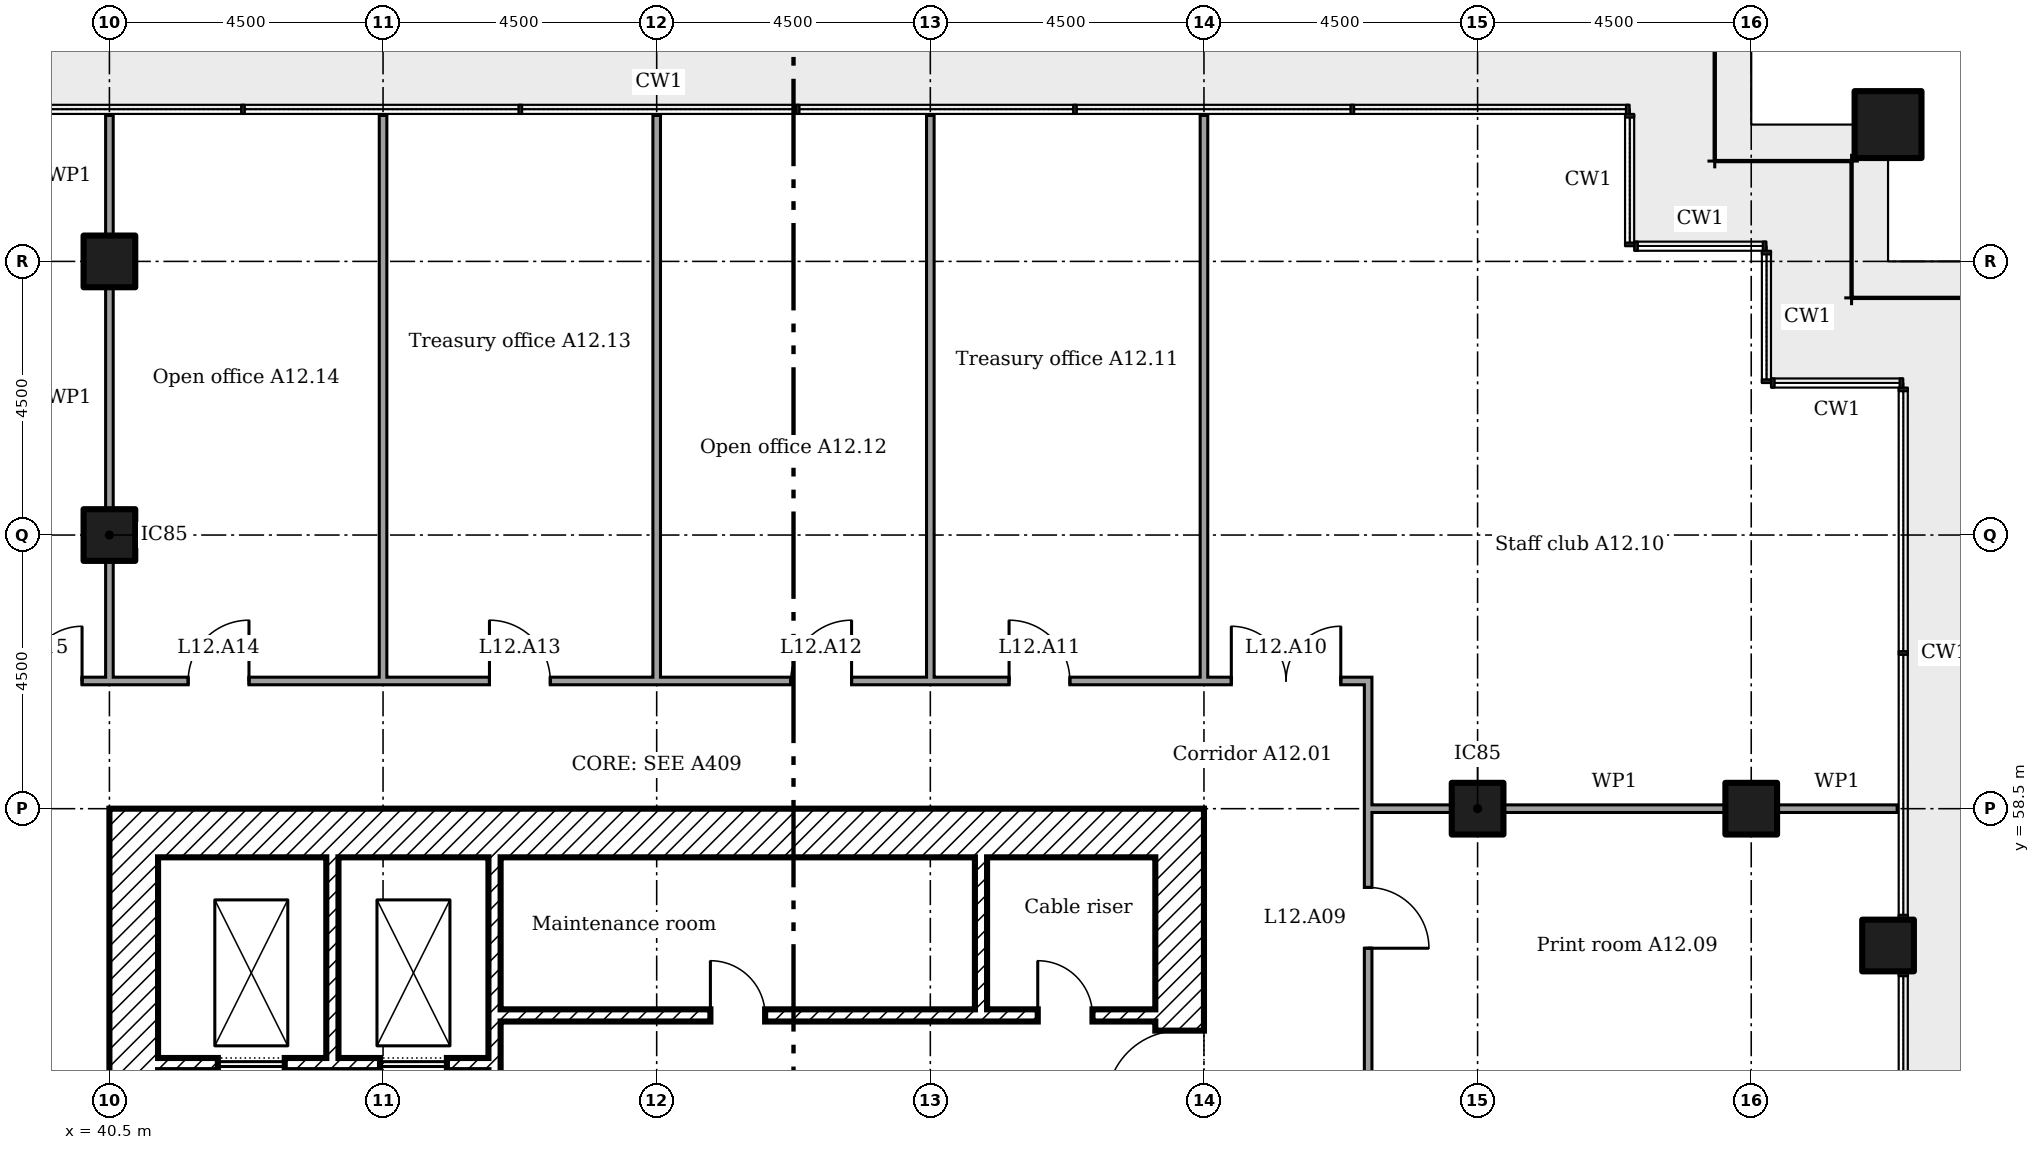
"""IFC4 building model, lengths in metres.
Left out: names, types, materials, properties, quantities, classifications, styles, units other than length and angle.
Written with IfcOpenShell. Run it as: python <this file> out.ifc"""

import sys

from ifc_helpers import new_model, si_unit, direction, frame, frame_2d, origin, origin_2d, place, context, subcontext, project, spatial, rectangle, extrude, element, fill, save


model = new_model("IFC4")
c1 = context("Model", 3, precision=1e-05, world=origin(), true_north=direction((0.0, 1.0)))
c2 = subcontext(c1, "Body", "Model", "MODEL_VIEW")
j1 = project(units=[si_unit("LENGTHUNIT", "METRE"), si_unit("PLANEANGLEUNIT", "RADIAN")], contexts=[c1])
p1 = place(None, origin())
s1 = spatial("IfcSite", under=j1, at=p1, CompositionType="ELEMENT")
p2 = place(p1, origin())
s2 = spatial("IfcBuilding", under=s1, at=p2, CompositionType="ELEMENT")
p3 = place(p2, frame((0.0, 0.0, 54.6)))
s3 = spatial("IfcBuildingStorey", under=s2, at=p3, CompositionType="ELEMENT", Elevation=54.6)
p4 = place(p3, frame((69.75, 69.75, 0.0)))
e1 = element("IfcColumn", 1, at=p4, inside=s3, PredefinedType="COLUMN", context=c2, shape_type="SweptSolid", body=[
    extrude(rectangle(XDim=1.1, YDim=1.1, at=origin_2d()), origin(), (0.0, 0.0, 1.0), 3.6),
])
for number, where in (
    (2, (40.5, 63.0, 0.0)),
    (3, (40.5, 67.5, 0.0)),
    (4, (63.0, 58.5, 0.0)),
    (5, (67.5, 58.5, 0.0)),
    (6, (69.75, 56.25, 0.0)),
):
    element("IfcColumn", number, at=place(p3, frame(where)), inside=s3, PredefinedType="COLUMN", context=c2, shape_type="SweptSolid", body=[
        extrude(rectangle(XDim=0.85, YDim=0.85, at=origin_2d()), origin(), (0.0, 0.0, 1.0), 3.6),
    ])
p5 = place(p3, frame((58.1, 40.5, 0.0), z_axis=(0.0, 0.0, 1.0), x_axis=(0.0, 1.0, 0.0)))
e7 = element("IfcWall", 7, at=p5, inside=s3, PredefinedType="SHEAR", context=c2, shape_type="SweptSolid", body=[
    extrude(rectangle(XDim=18.0, YDim=0.8, at=frame_2d((9.0, 0.0))), origin(), (0.0, 0.0, 1.0), 3.35),
])
p6 = place(p5, frame((13.15, 0.0, 0.0)))
e8 = element("IfcOpeningElement", 8, at=p6, cuts=e7, PredefinedType="OPENING", context=c2, shape_type="SweptSolid", body=[
    extrude(rectangle(XDim=1.2, YDim=2.1, at=frame_2d((0.6, 1.05))), frame((0.0, 0.41, 0.0), z_axis=(0.0, -1.0, 0.0), x_axis=(1.0, 0.0, 0.0)), (0.0, 0.0, 1.0), 0.82),
])
p7 = place(p5, frame((3.9, 0.0, 0.0)))
e9 = element("IfcOpeningElement", 9, at=p7, cuts=e7, PredefinedType="OPENING", context=c2, shape_type="SweptSolid", body=[
    extrude(rectangle(XDim=1.8, YDim=2.1, at=frame_2d((0.9, 1.05))), frame((0.0, 0.41, 0.0), z_axis=(0.0, -1.0, 0.0), x_axis=(1.0, 0.0, 0.0)), (0.0, 0.0, 1.0), 0.82),
])
p8 = place(p5, frame((11.525, 0.0, 0.0)))
e10 = element("IfcOpeningElement", 10, at=p8, cuts=e7, PredefinedType="OPENING", context=c2, shape_type="SweptSolid", body=[
    extrude(rectangle(XDim=1.0, YDim=2.1, at=frame_2d((0.5, 1.05))), frame((0.0, 0.41, 0.0), z_axis=(0.0, -1.0, 0.0), x_axis=(1.0, 0.0, 0.0)), (0.0, 0.0, 1.0), 0.82),
])
p9 = place(p3, frame((41.3, 58.1, 0.0)))
e11 = element("IfcWall", 11, at=p9, inside=s3, PredefinedType="SHEAR", context=c2, shape_type="SweptSolid", body=[
    extrude(rectangle(XDim=16.4, YDim=0.8, at=frame_2d((8.2, 0.0))), origin(), (0.0, 0.0, 1.0), 3.35),
])
p10 = place(p3, frame((40.9, 40.5, 0.0), z_axis=(0.0, 0.0, 1.0), x_axis=(0.0, 1.0, 0.0)))
e12 = element("IfcWall", 12, at=p10, inside=s3, PredefinedType="SHEAR", context=c2, shape_type="SweptSolid", body=[
    extrude(rectangle(XDim=18.0, YDim=0.8, at=frame_2d((9.0, 0.0))), origin(), (0.0, 0.0, 1.0), 3.35),
])
p11 = place(p10, frame((3.65, 0.0, 0.0)))
e13 = element("IfcOpeningElement", 13, at=p11, cuts=e12, PredefinedType="OPENING", context=c2, shape_type="SweptSolid", body=[
    extrude(rectangle(XDim=1.2, YDim=2.1, at=frame_2d((0.6, 1.05))), frame((0.0, 0.41, 0.0), z_axis=(0.0, -1.0, 0.0), x_axis=(1.0, 0.0, 0.0)), (0.0, 0.0, 1.0), 0.82),
])
p12 = place(p10, frame((5.475, 0.0, 0.0)))
e14 = element("IfcOpeningElement", 14, at=p12, cuts=e12, PredefinedType="OPENING", context=c2, shape_type="SweptSolid", body=[
    extrude(rectangle(XDim=1.0, YDim=2.1, at=frame_2d((0.5, 1.05))), frame((0.0, 0.41, 0.0), z_axis=(0.0, -1.0, 0.0), x_axis=(1.0, 0.0, 0.0)), (0.0, 0.0, 1.0), 0.82),
])
p13 = place(p10, frame((12.3, 0.0, 0.0)))
e15 = element("IfcOpeningElement", 15, at=p13, cuts=e12, PredefinedType="OPENING", context=c2, shape_type="SweptSolid", body=[
    extrude(rectangle(XDim=1.0, YDim=2.1, at=frame_2d((0.5, 1.05))), frame((0.0, 0.41, 0.0), z_axis=(0.0, -1.0, 0.0), x_axis=(1.0, 0.0, 0.0)), (0.0, 0.0, 1.0), 0.82),
])
p14 = place(p3, frame((44.167, 57.7, 0.0), z_axis=(0.0, 0.0, 1.0), x_axis=(0.0, -1.0, 0.0)))
e16 = element("IfcWall", 16, at=p14, inside=s3, PredefinedType="SHEAR", context=c2, shape_type="SweptSolid", body=[
    extrude(rectangle(XDim=3.3, YDim=0.2, at=frame_2d((1.65, 0.0))), origin(), (0.0, 0.0, 1.0), 3.35),
])
p15 = place(p3, frame((46.833, 57.7, 0.0), z_axis=(0.0, 0.0, 1.0), x_axis=(0.0, -1.0, 0.0)))
e17 = element("IfcWall", 17, at=p15, inside=s3, PredefinedType="SHEAR", context=c2, shape_type="SweptSolid", body=[
    extrude(rectangle(XDim=4.4, YDim=0.2, at=frame_2d((2.2, 0.0))), origin(), (0.0, 0.0, 1.0), 3.35),
])
p16 = place(p3, frame((54.833, 57.7, 0.0), z_axis=(0.0, 0.0, 1.0), x_axis=(0.0, -1.0, 0.0)))
e18 = element("IfcWall", 18, at=p16, inside=s3, PredefinedType="SHEAR", context=c2, shape_type="SweptSolid", body=[
    extrude(rectangle(XDim=2.5, YDim=0.2, at=frame_2d((1.25, 0.0))), origin(), (0.0, 0.0, 1.0), 3.35),
])
p17 = place(p3, frame((46.933, 55.1, 0.0)))
e19 = element("IfcWall", 19, at=p17, inside=s3, PredefinedType="SHEAR", context=c2, shape_type="SweptSolid", body=[
    extrude(rectangle(XDim=10.767, YDim=0.2, at=frame_2d((5.383, 0.0))), origin(), (0.0, 0.0, 1.0), 3.35),
])
p18 = place(p17, frame((8.833, 0.0, 0.0)))
e20 = element("IfcOpeningElement", 20, at=p18, cuts=e19, PredefinedType="OPENING", context=c2, shape_type="SweptSolid", body=[
    extrude(rectangle(XDim=0.9, YDim=2.1, at=frame_2d((0.45, 1.05))), frame((0.0, 0.11, 0.0), z_axis=(0.0, -1.0, 0.0), x_axis=(1.0, 0.0, 0.0)), (0.0, 0.0, 1.0), 0.22),
])
p19 = place(p17, frame((3.45, 0.0, 0.0)))
e21 = element("IfcOpeningElement", 21, at=p19, cuts=e19, PredefinedType="OPENING", context=c2, shape_type="SweptSolid", body=[
    extrude(rectangle(XDim=0.9, YDim=2.1, at=frame_2d((0.45, 1.05))), frame((0.0, 0.11, 0.0), z_axis=(0.0, -1.0, 0.0), x_axis=(1.0, 0.0, 0.0)), (0.0, 0.0, 1.0), 0.22),
])
p20 = place(p3, frame((41.3, 54.3, 0.0)))
e22 = element("IfcWall", 22, at=p20, inside=s3, PredefinedType="SHEAR", context=c2, shape_type="SweptSolid", body=[
    extrude(rectangle(XDim=5.433, YDim=0.2, at=frame_2d((2.717, 0.0))), origin(), (0.0, 0.0, 1.0), 3.35),
])
p21 = place(p20, frame((0.983, 0.0, 0.0)))
e23 = element("IfcOpeningElement", 23, at=p21, cuts=e22, PredefinedType="OPENING", context=c2, shape_type="SweptSolid", body=[
    extrude(rectangle(XDim=1.1, YDim=2.1, at=frame_2d((0.55, 1.05))), frame((0.0, 0.11, 0.0), z_axis=(0.0, -1.0, 0.0), x_axis=(1.0, 0.0, 0.0)), (0.0, 0.0, 1.0), 0.22),
])
p22 = place(p20, frame((3.65, 0.0, 0.0)))
e24 = element("IfcOpeningElement", 24, at=p22, cuts=e22, PredefinedType="OPENING", context=c2, shape_type="SweptSolid", body=[
    extrude(rectangle(XDim=1.1, YDim=2.1, at=frame_2d((0.55, 1.05))), frame((0.0, 0.11, 0.0), z_axis=(0.0, -1.0, 0.0), x_axis=(1.0, 0.0, 0.0)), (0.0, 0.0, 1.0), 0.22),
])
p23 = place(p3, frame((61.2, 58.5, 0.0)))
e25 = element("IfcWall", 25, at=p23, inside=s3, PredefinedType="PARTITIONING", context=c2, shape_type="SweptSolid", body=[
    extrude(rectangle(XDim=1.375, YDim=0.125, at=frame_2d((0.688, 0.0))), origin(), (0.0, 0.0, 1.0), 2.676),
])
p24 = place(p3, frame((63.425, 58.5, 0.0)))
e26 = element("IfcWall", 26, at=p24, inside=s3, PredefinedType="PARTITIONING", context=c2, shape_type="SweptSolid", body=[
    extrude(rectangle(XDim=3.65, YDim=0.125, at=frame_2d((1.825, 0.0))), origin(), (0.0, 0.0, 1.0), 2.676),
])
p25 = place(p3, frame((67.925, 58.5, 0.0)))
e27 = element("IfcWall", 27, at=p25, inside=s3, PredefinedType="PARTITIONING", context=c2, shape_type="SweptSolid", body=[
    extrude(rectangle(XDim=1.975, YDim=0.125, at=frame_2d((0.987, 0.0))), origin(), (0.0, 0.0, 1.0), 2.676),
])
p26 = place(p3, frame((37.738, 60.6, 0.0)))
e28 = element("IfcWall", 28, at=p26, inside=s3, PredefinedType="PARTITIONING", context=c2, shape_type="SweptSolid", body=[
    extrude(rectangle(XDim=23.525, YDim=0.125, at=frame_2d((11.762, 0.0))), origin(), (0.0, 0.0, 1.0), 3.45),
])
p27 = place(p26, frame((21.212, 0.0, 0.0)))
e29 = element("IfcOpeningElement", 29, at=p27, cuts=e28, PredefinedType="OPENING", context=c2, shape_type="SweptSolid", body=[
    extrude(rectangle(XDim=1.8, YDim=2.1, at=frame_2d((0.9, 1.05))), frame((0.0, 0.073, 0.0), z_axis=(0.0, -1.0, 0.0), x_axis=(1.0, 0.0, 0.0)), (0.0, 0.0, 1.0), 0.145),
])
p28 = place(p26, frame((17.558, 0.0, 0.0)))
e30 = element("IfcOpeningElement", 30, at=p28, cuts=e28, PredefinedType="OPENING", context=c2, shape_type="SweptSolid", body=[
    extrude(rectangle(XDim=1.0, YDim=2.1, at=frame_2d((0.5, 1.05))), frame((0.0, 0.073, 0.0), z_axis=(0.0, -1.0, 0.0), x_axis=(1.0, 0.0, 0.0)), (0.0, 0.0, 1.0), 0.145),
])
p29 = place(p26, frame((13.968, 0.0, 0.0)))
e31 = element("IfcOpeningElement", 31, at=p29, cuts=e28, PredefinedType="OPENING", context=c2, shape_type="SweptSolid", body=[
    extrude(rectangle(XDim=1.0, YDim=2.1, at=frame_2d((0.5, 1.05))), frame((0.0, 0.073, 0.0), z_axis=(0.0, -1.0, 0.0), x_axis=(1.0, 0.0, 0.0)), (0.0, 0.0, 1.0), 0.145),
])
p30 = place(p26, frame((9.012, 0.0, 0.0)))
e32 = element("IfcOpeningElement", 32, at=p30, cuts=e28, PredefinedType="OPENING", context=c2, shape_type="SweptSolid", body=[
    extrude(rectangle(XDim=1.0, YDim=2.1, at=frame_2d((0.5, 1.05))), frame((0.0, 0.073, 0.0), z_axis=(0.0, -1.0, 0.0), x_axis=(1.0, 0.0, 0.0)), (0.0, 0.0, 1.0), 0.145),
])
p31 = place(p26, frame((4.058, 0.0, 0.0)))
e33 = element("IfcOpeningElement", 33, at=p31, cuts=e28, PredefinedType="OPENING", context=c2, shape_type="SweptSolid", body=[
    extrude(rectangle(XDim=1.0, YDim=2.1, at=frame_2d((0.5, 1.05))), frame((0.0, 0.073, 0.0), z_axis=(0.0, -1.0, 0.0), x_axis=(1.0, 0.0, 0.0)), (0.0, 0.0, 1.0), 0.145),
])
p32 = place(p26, frame((0.512, 0.0, 0.0)))
e34 = element("IfcOpeningElement", 34, at=p32, cuts=e28, PredefinedType="OPENING", context=c2, shape_type="SweptSolid", body=[
    extrude(rectangle(XDim=1.8, YDim=2.1, at=frame_2d((0.9, 1.05))), frame((0.0, 0.073, 0.0), z_axis=(0.0, -1.0, 0.0), x_axis=(1.0, 0.0, 0.0)), (0.0, 0.0, 1.0), 0.145),
])
p33 = place(p3, frame((40.5, 60.6, 0.0), z_axis=(0.0, 0.0, 1.0), x_axis=(0.0, 1.0, 0.0)))
e35 = element("IfcWall", 35, at=p33, inside=s3, PredefinedType="PARTITIONING", context=c2, shape_type="SweptSolid", body=[
    extrude(rectangle(XDim=1.975, YDim=0.125, at=frame_2d((0.987, 0.0))), origin(), (0.0, 0.0, 1.0), 2.676),
])
p34 = place(p3, frame((40.5, 63.425, 0.0), z_axis=(0.0, 0.0, 1.0), x_axis=(0.0, 1.0, 0.0)))
e36 = element("IfcWall", 36, at=p34, inside=s3, PredefinedType="PARTITIONING", context=c2, shape_type="SweptSolid", body=[
    extrude(rectangle(XDim=3.65, YDim=0.125, at=frame_2d((1.825, 0.0))), origin(), (0.0, 0.0, 1.0), 2.676),
])
p35 = place(p3, frame((40.5, 67.925, 0.0), z_axis=(0.0, 0.0, 1.0), x_axis=(0.0, 1.0, 0.0)))
e37 = element("IfcWall", 37, at=p35, inside=s3, PredefinedType="PARTITIONING", context=c2, shape_type="SweptSolid", body=[
    extrude(rectangle(XDim=1.975, YDim=0.125, at=frame_2d((0.987, 0.0))), origin(), (0.0, 0.0, 1.0), 2.676),
])
for number, where, z_axis, x_axis in (
    (38, (45.0, 60.6, 0.0), (0.0, 0.0, 1.0), (0.0, 1.0, 0.0)),
    (39, (49.5, 60.6, 0.0), (0.0, 0.0, 1.0), (0.0, 1.0, 0.0)),
    (40, (54.0, 60.6, 0.0), (0.0, 0.0, 1.0), (0.0, 1.0, 0.0)),
    (41, (58.5, 60.6, 0.0), (0.0, 0.0, 1.0), (0.0, 1.0, 0.0)),
):
    element("IfcWall", number, at=place(p3, frame(where, z_axis=z_axis, x_axis=x_axis)), inside=s3, PredefinedType="PARTITIONING", context=c2, shape_type="SweptSolid", body=[
        extrude(rectangle(XDim=9.3, YDim=0.125, at=frame_2d((4.65, 0.0))), origin(), (0.0, 0.0, 1.0), 2.766),
    ])
p36 = place(p3, frame((61.2, 38.462, 0.0), z_axis=(0.0, 0.0, 1.0), x_axis=(0.0, 1.0, 0.0)))
e42 = element("IfcWall", 42, at=p36, inside=s3, PredefinedType="PARTITIONING", context=c2, shape_type="SweptSolid", body=[
    extrude(rectangle(XDim=22.075, YDim=0.125, at=frame_2d((11.038, 0.0))), origin(), (0.0, 0.0, 1.0), 3.45),
])
p37 = place(p36, frame((6.038, 0.0, 0.0)))
e43 = element("IfcOpeningElement", 43, at=p37, cuts=e42, PredefinedType="OPENING", context=c2, shape_type="SweptSolid", body=[
    extrude(rectangle(XDim=1.0, YDim=2.1, at=frame_2d((0.5, 1.05))), frame((0.0, 0.073, 0.0), z_axis=(0.0, -1.0, 0.0), x_axis=(1.0, 0.0, 0.0)), (0.0, 0.0, 1.0), 0.145),
])
p38 = place(p36, frame((12.333, 0.0, 0.0)))
e44 = element("IfcOpeningElement", 44, at=p38, cuts=e42, PredefinedType="OPENING", context=c2, shape_type="SweptSolid", body=[
    extrude(rectangle(XDim=1.0, YDim=2.1, at=frame_2d((0.5, 1.05))), frame((0.0, 0.073, 0.0), z_axis=(0.0, -1.0, 0.0), x_axis=(1.0, 0.0, 0.0)), (0.0, 0.0, 1.0), 0.145),
])
p39 = place(p36, frame((17.742, 0.0, 0.0)))
e45 = element("IfcOpeningElement", 45, at=p39, cuts=e42, PredefinedType="OPENING", context=c2, shape_type="SweptSolid", body=[
    extrude(rectangle(XDim=1.0, YDim=2.1, at=frame_2d((0.5, 1.05))), frame((0.0, 0.073, 0.0), z_axis=(0.0, -1.0, 0.0), x_axis=(1.0, 0.0, 0.0)), (0.0, 0.0, 1.0), 0.145),
])
p40 = place(p6, origin())
e46 = element("IfcDoor", 46, at=p40, inside=s3, OperationType="SINGLE_SWING_RIGHT", PredefinedType="DOOR", context=c2, shape_type="SweptSolid", body=[
    extrude(rectangle(XDim=1.2, YDim=2.1, at=frame_2d((0.6, 1.05))), frame((0.0, 0.025, 0.0), z_axis=(0.0, -1.0, 0.0), x_axis=(1.0, 0.0, 0.0)), (0.0, 0.0, 1.0), 0.05),
])
fill(e8, e46)
p41 = place(p18, origin())
e47 = element("IfcDoor", 47, at=p41, inside=s3, OperationType="SINGLE_SWING_RIGHT", PredefinedType="DOOR", context=c2, shape_type="SweptSolid", body=[
    extrude(rectangle(XDim=0.9, YDim=2.1, at=frame_2d((0.45, 1.05))), frame((0.0, 0.025, 0.0), z_axis=(0.0, -1.0, 0.0), x_axis=(1.0, 0.0, 0.0)), (0.0, 0.0, 1.0), 0.05),
])
fill(e20, e47)
p42 = place(p19, origin())
e48 = element("IfcDoor", 48, at=p42, inside=s3, OperationType="SINGLE_SWING_RIGHT", PredefinedType="DOOR", context=c2, shape_type="SweptSolid", body=[
    extrude(rectangle(XDim=0.9, YDim=2.1, at=frame_2d((0.45, 1.05))), frame((0.0, 0.025, 0.0), z_axis=(0.0, -1.0, 0.0), x_axis=(1.0, 0.0, 0.0)), (0.0, 0.0, 1.0), 0.05),
])
fill(e21, e48)
p43 = place(p21, origin())
e49 = element("IfcDoor", 49, at=p43, inside=s3, OperationType="SLIDING_TO_LEFT", PredefinedType="DOOR", context=c2, shape_type="SweptSolid", body=[
    extrude(rectangle(XDim=1.1, YDim=2.1, at=frame_2d((0.55, 1.05))), frame((0.0, 0.025, 0.0), z_axis=(0.0, -1.0, 0.0), x_axis=(1.0, 0.0, 0.0)), (0.0, 0.0, 1.0), 0.05),
])
fill(e23, e49)
p44 = place(p22, origin())
e50 = element("IfcDoor", 50, at=p44, inside=s3, OperationType="SLIDING_TO_LEFT", PredefinedType="DOOR", context=c2, shape_type="SweptSolid", body=[
    extrude(rectangle(XDim=1.1, YDim=2.1, at=frame_2d((0.55, 1.05))), frame((0.0, 0.025, 0.0), z_axis=(0.0, -1.0, 0.0), x_axis=(1.0, 0.0, 0.0)), (0.0, 0.0, 1.0), 0.05),
])
fill(e24, e50)
p45 = place(p39, frame((1.0, 0.0, 0.0), x_axis=(-1.0, 0.0, 0.0)))
e51 = element("IfcDoor", 51, at=p45, inside=s3, OperationType="SINGLE_SWING_LEFT", PredefinedType="DOOR", context=c2, shape_type="SweptSolid", body=[
    extrude(rectangle(XDim=1.0, YDim=2.1, at=frame_2d((0.5, 1.05))), frame((0.0, 0.025, 0.0), z_axis=(0.0, -1.0, 0.0), x_axis=(1.0, 0.0, 0.0)), (0.0, 0.0, 1.0), 0.05),
])
fill(e45, e51)
p46 = place(p27, origin())
e52 = element("IfcDoor", 52, at=p46, inside=s3, OperationType="DOUBLE_DOOR_SINGLE_SWING", PredefinedType="DOOR", context=c2, shape_type="SweptSolid", body=[
    extrude(rectangle(XDim=1.8, YDim=2.1, at=frame_2d((0.9, 1.05))), frame((0.0, 0.025, 0.0), z_axis=(0.0, -1.0, 0.0), x_axis=(1.0, 0.0, 0.0)), (0.0, 0.0, 1.0), 0.05),
])
fill(e29, e52)
p47 = place(p28, origin())
e53 = element("IfcDoor", 53, at=p47, inside=s3, OperationType="SINGLE_SWING_RIGHT", PredefinedType="DOOR", context=c2, shape_type="SweptSolid", body=[
    extrude(rectangle(XDim=1.0, YDim=2.1, at=frame_2d((0.5, 1.05))), frame((0.0, 0.025, 0.0), z_axis=(0.0, -1.0, 0.0), x_axis=(1.0, 0.0, 0.0)), (0.0, 0.0, 1.0), 0.05),
])
fill(e30, e53)
p48 = place(p29, origin())
e54 = element("IfcDoor", 54, at=p48, inside=s3, OperationType="SINGLE_SWING_LEFT", PredefinedType="DOOR", context=c2, shape_type="SweptSolid", body=[
    extrude(rectangle(XDim=1.0, YDim=2.1, at=frame_2d((0.5, 1.05))), frame((0.0, 0.025, 0.0), z_axis=(0.0, -1.0, 0.0), x_axis=(1.0, 0.0, 0.0)), (0.0, 0.0, 1.0), 0.05),
])
fill(e31, e54)
p49 = place(p30, origin())
e55 = element("IfcDoor", 55, at=p49, inside=s3, OperationType="SINGLE_SWING_RIGHT", PredefinedType="DOOR", context=c2, shape_type="SweptSolid", body=[
    extrude(rectangle(XDim=1.0, YDim=2.1, at=frame_2d((0.5, 1.05))), frame((0.0, 0.025, 0.0), z_axis=(0.0, -1.0, 0.0), x_axis=(1.0, 0.0, 0.0)), (0.0, 0.0, 1.0), 0.05),
])
fill(e32, e55)
p50 = place(p31, origin())
e56 = element("IfcDoor", 56, at=p50, inside=s3, OperationType="SINGLE_SWING_LEFT", PredefinedType="DOOR", context=c2, shape_type="SweptSolid", body=[
    extrude(rectangle(XDim=1.0, YDim=2.1, at=frame_2d((0.5, 1.05))), frame((0.0, 0.025, 0.0), z_axis=(0.0, -1.0, 0.0), x_axis=(1.0, 0.0, 0.0)), (0.0, 0.0, 1.0), 0.05),
])
fill(e33, e56)
p51 = place(p32, origin())
e57 = element("IfcDoor", 57, at=p51, inside=s3, OperationType="DOUBLE_DOOR_SINGLE_SWING", PredefinedType="DOOR", context=c2, shape_type="SweptSolid", body=[
    extrude(rectangle(XDim=1.8, YDim=2.1, at=frame_2d((0.9, 1.05))), frame((0.0, 0.025, 0.0), z_axis=(0.0, -1.0, 0.0), x_axis=(1.0, 0.0, 0.0)), (0.0, 0.0, 1.0), 0.05),
])
fill(e34, e57)
save(model, sys.argv[1])
